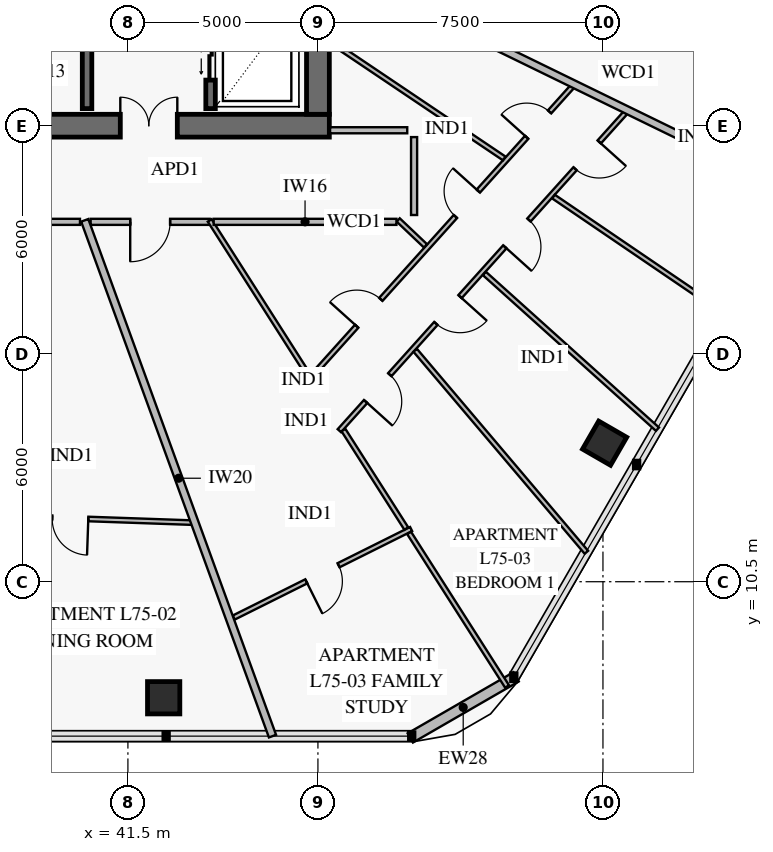
"""IFC4 building model, lengths in metres.
Left out: names, types, materials, properties, quantities, classifications, styles, units other than length and angle.
Written with IfcOpenShell. Run it as: python <this file> out.ifc"""

import sys

from ifc_helpers import new_model, si_unit, direction, frame, frame_2d, origin, origin_2d, place, context, subcontext, project, spatial, rectangle, extrude, element, fill, save


model = new_model("IFC4")
c1 = context("Model", 3, precision=1e-05, world=origin(), true_north=direction((0.0, 1.0)))
c2 = subcontext(c1, "Body", "Model", "MODEL_VIEW")
j1 = project(units=[si_unit("LENGTHUNIT", "METRE"), si_unit("PLANEANGLEUNIT", "RADIAN")], contexts=[c1])
p1 = place(None, origin())
s1 = spatial("IfcSite", under=j1, at=p1, CompositionType="ELEMENT")
p2 = place(p1, origin())
s2 = spatial("IfcBuilding", under=s1, at=p2, CompositionType="ELEMENT")
p3 = place(p2, frame((0.0, 0.0, 295.8)))
s3 = spatial("IfcBuildingStorey", under=s2, at=p3, CompositionType="ELEMENT", Elevation=295.8)
p4 = place(p3, frame((37.35, 22.5, 0.0), z_axis=(0.0, 0.0, 1.0), x_axis=(1.0, 0.0, 0.0)))
e1 = element("IfcWall", 1, at=p4, inside=s3, PredefinedType="SHEAR", context=c2, shape_type="SweptSolid", body=[
    extrude(rectangle(XDim=9.45, YDim=0.6, at=frame_2d((4.725, 0.0))), origin(), (0.0, 0.0, 1.0), 3.8),
])
p5 = place(p4, frame((3.95, 0.0, 0.0)))
e2 = element("IfcOpeningElement", 2, at=p5, cuts=e1, PredefinedType="OPENING", context=c2, shape_type="SweptSolid", body=[
    extrude(rectangle(XDim=1.5, YDim=2.15, at=frame_2d((0.75, 1.075))), frame((0.0, 0.312, 0.0), z_axis=(0.0, -1.0, 0.0), x_axis=(1.0, 0.0, 0.0)), (0.0, 0.0, 1.0), 0.624),
])
p6 = place(p3, frame((46.5, 22.8, 0.0), z_axis=(0.0, 0.0, 1.0), x_axis=(0.0, 1.0, 0.0)))
e3 = element("IfcWall", 3, at=p6, inside=s3, PredefinedType="SHEAR", context=c2, shape_type="SweptSolid", body=[
    extrude(rectangle(XDim=18.4, YDim=0.6, at=frame_2d((9.2, 0.0))), origin(), (0.0, 0.0, 1.0), 3.8),
])
p7 = place(p6, frame((8.95, 0.0, 0.0)))
e4 = element("IfcOpeningElement", 4, at=p7, cuts=e3, PredefinedType="OPENING", context=c2, shape_type="SweptSolid", body=[
    extrude(rectangle(XDim=1.1, YDim=2.15, at=frame_2d((0.55, 1.075))), frame((0.0, 0.312, 0.0), z_axis=(0.0, -1.0, 0.0), x_axis=(1.0, 0.0, 0.0)), (0.0, 0.0, 1.0), 0.624),
])
for number, where, z_axis, x_axis in (
    (5, (42.441, 7.446, 0.0), (0.0, 0.0, 1.0), (1.0, 0.0, 0.0)),
    (6, (54.044, 14.145, 0.0), (0.0, 0.0, 1.0), (0.5, 0.866, 0.0)),
):
    element("IfcColumn", number, at=place(p3, frame(where, z_axis=z_axis, x_axis=x_axis)), inside=s3, PredefinedType="COLUMN", context=c2, shape_type="SweptSolid", body=[
        extrude(rectangle(XDim=0.85, YDim=0.85, at=origin_2d()), origin(), (0.0, 0.0, 1.0), 3.55),
    ])
p8 = place(p3, frame((51.715, 7.996, 0.0), z_axis=(0.0, 0.0, 1.0), x_axis=(-0.866028773314, -0.499994163758, 0.0)))
e7 = element("IfcWall", 7, at=p8, inside=s3, PredefinedType="SOLIDWALL", context=c2, shape_type="SweptSolid", body=[
    extrude(rectangle(XDim=3.215, YDim=0.28, at=frame_2d((1.607, 0.0))), origin(), (0.0, 0.0, 1.0), 3.55),
])
p9 = place(p3, frame((40.425, 22.95, 0.0), z_axis=(0.0, 0.0, 1.0), x_axis=(0.0, 1.0, 0.0)))
e8 = element("IfcWall", 8, at=p9, inside=s3, PredefinedType="SOLIDWALL", context=c2, shape_type="SweptSolid", body=[
    extrude(rectangle(XDim=8.2, YDim=0.25, at=frame_2d((4.1, 0.0))), origin(), (0.0, 0.0, 1.0), 3.8),
])
p10 = place(p3, frame((43.675, 22.95, 0.0), z_axis=(0.0, 0.0, 1.0), x_axis=(0.0, 1.0, 0.0)))
e9 = element("IfcWall", 9, at=p10, inside=s3, PredefinedType="SOLIDWALL", context=c2, shape_type="SweptSolid", body=[
    extrude(rectangle(XDim=8.2, YDim=0.25, at=frame_2d((4.1, 0.0))), origin(), (0.0, 0.0, 1.0), 3.8),
])
p11 = place(p10, frame((0.75, 0.0, 0.0)))
e10 = element("IfcOpeningElement", 10, at=p11, cuts=e9, PredefinedType="OPENING", context=c2, shape_type="SweptSolid", body=[
    extrude(rectangle(XDim=1.3, YDim=2.3, at=frame_2d((0.65, 1.15))), frame((0.0, 0.137, 0.0), z_axis=(0.0, -1.0, 0.0), x_axis=(1.0, 0.0, 0.0)), (0.0, 0.0, 1.0), 0.274),
])
p12 = place(p10, frame((3.7, 0.0, 0.0)))
e11 = element("IfcOpeningElement", 11, at=p12, cuts=e9, PredefinedType="OPENING", context=c2, shape_type="SweptSolid", body=[
    extrude(rectangle(XDim=1.3, YDim=2.3, at=frame_2d((0.65, 1.15))), frame((0.0, 0.137, 0.0), z_axis=(0.0, -1.0, 0.0), x_axis=(1.0, 0.0, 0.0)), (0.0, 0.0, 1.0), 0.274),
])
p13 = place(p10, frame((6.62, 0.0, 0.0)))
e12 = element("IfcOpeningElement", 12, at=p13, cuts=e9, PredefinedType="OPENING", context=c2, shape_type="SweptSolid", body=[
    extrude(rectangle(XDim=0.9, YDim=2.1, at=frame_2d((0.45, 1.05))), frame((0.0, 0.137, 0.0), z_axis=(0.0, -1.0, 0.0), x_axis=(1.0, 0.0, 0.0)), (0.0, 0.0, 1.0), 0.274),
])
p14 = place(p3, frame((32.839, 12.417, 0.0), z_axis=(0.0, 0.0, 1.0), x_axis=(0.999390413178, -0.034911345561, 0.0)))
e13 = element("IfcWall", 13, at=p14, inside=s3, PredefinedType="PARTITIONING", context=c2, shape_type="SweptSolid", body=[
    extrude(rectangle(XDim=10.336, YDim=0.12, at=frame_2d((5.168, 0.0))), origin(), (0.0, 0.0, 1.0), 2.95),
])
p15 = place(p14, frame((1.746, 0.0, 0.0)))
e14 = element("IfcOpeningElement", 14, at=p15, cuts=e13, PredefinedType="OPENING", context=c2, shape_type="SweptSolid", body=[
    extrude(rectangle(XDim=0.95, YDim=2.1, at=frame_2d((0.475, 1.05))), frame((0.0, 0.072, 0.0), z_axis=(0.0, -1.0, 0.0), x_axis=(1.0, 0.0, 0.0)), (0.0, 0.0, 1.0), 0.144),
])
p16 = place(p14, frame((6.673, 0.0, 0.0)))
e15 = element("IfcOpeningElement", 15, at=p16, cuts=e13, PredefinedType="OPENING", context=c2, shape_type="SweptSolid", body=[
    extrude(rectangle(XDim=0.95, YDim=2.1, at=frame_2d((0.475, 1.05))), frame((0.0, 0.072, 0.0), z_axis=(0.0, -1.0, 0.0), x_axis=(1.0, 0.0, 0.0)), (0.0, 0.0, 1.0), 0.144),
])
p17 = place(p3, frame((44.284, 9.557, 0.0), z_axis=(0.0, 0.0, 1.0), x_axis=(0.894782574854, 0.446502120642, 0.0)))
e16 = element("IfcWall", 16, at=p17, inside=s3, PredefinedType="PARTITIONING", context=c2, shape_type="SweptSolid", body=[
    extrude(rectangle(XDim=5.217, YDim=0.12, at=frame_2d((2.608, 0.0))), origin(), (0.0, 0.0, 1.0), 3.55),
])
p18 = place(p17, frame((2.133, 0.0, 0.0)))
e17 = element("IfcOpeningElement", 17, at=p18, cuts=e16, PredefinedType="OPENING", context=c2, shape_type="SweptSolid", body=[
    extrude(rectangle(XDim=0.95, YDim=2.1, at=frame_2d((0.475, 1.05))), frame((0.0, 0.072, 0.0), z_axis=(0.0, -1.0, 0.0), x_axis=(1.0, 0.0, 0.0)), (0.0, 0.0, 1.0), 0.144),
])
p19 = place(p3, frame((46.227, 15.786, 0.0), z_axis=(0.0, 0.0, 1.0), x_axis=(0.668867693005, 0.743381469539, 0.0)))
e18 = element("IfcWall", 18, at=p19, inside=s3, PredefinedType="PARTITIONING", context=c2, shape_type="SweptSolid", body=[
    extrude(rectangle(XDim=10.426, YDim=0.12, at=frame_2d((5.213, 0.0))), origin(), (0.0, 0.0, 1.0), 2.95),
])
p20 = place(p19, frame((1.934, 0.0, 0.0)))
e19 = element("IfcOpeningElement", 19, at=p20, cuts=e18, PredefinedType="OPENING", context=c2, shape_type="SweptSolid", body=[
    extrude(rectangle(XDim=0.95, YDim=2.1, at=frame_2d((0.475, 1.05))), frame((0.0, 0.072, 0.0), z_axis=(0.0, -1.0, 0.0), x_axis=(1.0, 0.0, 0.0)), (0.0, 0.0, 1.0), 0.144),
])
p21 = place(p19, frame((5.818, 0.0, 0.0)))
e20 = element("IfcOpeningElement", 20, at=p21, cuts=e18, PredefinedType="OPENING", context=c2, shape_type="SweptSolid", body=[
    extrude(rectangle(XDim=0.9, YDim=2.1, at=frame_2d((0.45, 1.05))), frame((0.0, 0.072, 0.0), z_axis=(0.0, -1.0, 0.0), x_axis=(1.0, 0.0, 0.0)), (0.0, 0.0, 1.0), 0.144),
])
p22 = place(p19, frame((8.621, 0.0, 0.0)))
e21 = element("IfcOpeningElement", 21, at=p22, cuts=e18, PredefinedType="OPENING", context=c2, shape_type="SweptSolid", body=[
    extrude(rectangle(XDim=0.9, YDim=2.1, at=frame_2d((0.45, 1.05))), frame((0.0, 0.072, 0.0), z_axis=(0.0, -1.0, 0.0), x_axis=(1.0, 0.0, 0.0)), (0.0, 0.0, 1.0), 0.144),
])
p23 = place(p3, frame((47.064, 14.474, 0.0), z_axis=(0.0, 0.0, 1.0), x_axis=(0.66887365587, 0.743376104326, 0.0)))
e22 = element("IfcWall", 22, at=p23, inside=s3, PredefinedType="PARTITIONING", context=c2, shape_type="SweptSolid", body=[
    extrude(rectangle(XDim=11.256, YDim=0.12, at=frame_2d((5.628, 0.0))), origin(), (0.0, 0.0, 1.0), 2.95),
])
p24 = place(p23, frame((1.033, 0.0, 0.0)))
e23 = element("IfcOpeningElement", 23, at=p24, cuts=e22, PredefinedType="OPENING", context=c2, shape_type="SweptSolid", body=[
    extrude(rectangle(XDim=0.95, YDim=2.1, at=frame_2d((0.475, 1.05))), frame((0.0, 0.072, 0.0), z_axis=(0.0, -1.0, 0.0), x_axis=(1.0, 0.0, 0.0)), (0.0, 0.0, 1.0), 0.144),
])
p25 = place(p23, frame((3.797, 0.0, 0.0)))
e24 = element("IfcOpeningElement", 24, at=p25, cuts=e22, PredefinedType="OPENING", context=c2, shape_type="SweptSolid", body=[
    extrude(rectangle(XDim=0.95, YDim=2.1, at=frame_2d((0.475, 1.05))), frame((0.0, 0.072, 0.0), z_axis=(0.0, -1.0, 0.0), x_axis=(1.0, 0.0, 0.0)), (0.0, 0.0, 1.0), 0.144),
])
p26 = place(p23, frame((6.509, 0.0, 0.0)))
e25 = element("IfcOpeningElement", 25, at=p26, cuts=e22, PredefinedType="OPENING", context=c2, shape_type="SweptSolid", body=[
    extrude(rectangle(XDim=0.95, YDim=2.1, at=frame_2d((0.475, 1.05))), frame((0.0, 0.072, 0.0), z_axis=(0.0, -1.0, 0.0), x_axis=(1.0, 0.0, 0.0)), (0.0, 0.0, 1.0), 0.144),
])
p27 = place(p23, frame((9.273, 0.0, 0.0)))
e26 = element("IfcOpeningElement", 26, at=p27, cuts=e22, PredefinedType="OPENING", context=c2, shape_type="SweptSolid", body=[
    extrude(rectangle(XDim=0.95, YDim=2.1, at=frame_2d((0.475, 1.05))), frame((0.0, 0.072, 0.0), z_axis=(0.0, -1.0, 0.0), x_axis=(1.0, 0.0, 0.0)), (0.0, 0.0, 1.0), 0.144),
])
p28 = place(p3, frame((40.519, 19.97, 0.0), z_axis=(0.0, 0.0, 1.0), x_axis=(1.0, 0.0, 0.0)))
e27 = element("IfcWall", 27, at=p28, inside=s3, PredefinedType="PARTITIONING", context=c2, shape_type="SweptSolid", body=[
    extrude(rectangle(XDim=3.133, YDim=0.16, at=frame_2d((1.566, 0.0))), origin(), (0.0, 0.0, 1.0), 3.55),
])
p29 = place(p28, frame((1.042, 0.0, 0.0)))
e28 = element("IfcOpeningElement", 28, at=p29, cuts=e27, PredefinedType="OPENING", context=c2, shape_type="SweptSolid", body=[
    extrude(rectangle(XDim=1.05, YDim=2.15, at=frame_2d((0.525, 1.075))), frame((0.0, 0.092, 0.0), z_axis=(0.0, -1.0, 0.0), x_axis=(1.0, 0.0, 0.0)), (0.0, 0.0, 1.0), 0.184),
])
p30 = place(p3, frame((40.364, 20.01, 0.0), z_axis=(0.0, 0.0, 1.0), x_axis=(0.342019888345, -0.939692713591, 0.0)))
e29 = element("IfcWall", 29, at=p30, inside=s3, PredefinedType="PARTITIONING", context=c2, shape_type="SweptSolid", body=[
    extrude(rectangle(XDim=14.445, YDim=0.2, at=frame_2d((7.222, 0.0))), origin(), (0.0, 0.0, 1.0), 2.93),
])
p31 = place(p3, frame((48.612, 20.02, 0.0), z_axis=(0.0, 0.0, 1.0), x_axis=(0.725214586294, -0.688522914525, 0.0)))
e30 = element("IfcWall", 30, at=p31, inside=s3, PredefinedType="PARTITIONING", context=c2, shape_type="SweptSolid", body=[
    extrude(rectangle(XDim=0.991, YDim=0.12, at=frame_2d((0.496, 0.0))), origin(), (0.0, 0.0, 1.0), 3.55),
])
p32 = place(p3, frame((46.808, 24.729, 0.0), z_axis=(0.0, 0.0, 1.0), x_axis=(0.829729536965, -0.558165652372, 0.0)))
e31 = element("IfcWall", 31, at=p32, inside=s3, PredefinedType="PARTITIONING", context=c2, shape_type="SweptSolid", body=[
    extrude(rectangle(XDim=5.536, YDim=0.12, at=frame_2d((2.768, 0.0))), origin(), (0.0, 0.0, 1.0), 3.55),
])
p33 = place(p3, frame((49.06, 16.59, 0.0), z_axis=(0.0, 0.0, 1.0), x_axis=(0.646504412068, -0.76291024713, 0.0)))
e32 = element("IfcWall", 32, at=p33, inside=s3, PredefinedType="PARTITIONING", context=c2, shape_type="SweptSolid", body=[
    extrude(rectangle(XDim=6.967, YDim=0.12, at=frame_2d((3.484, 0.0))), origin(), (0.0, 0.0, 1.0), 2.93),
])
p34 = place(p3, frame((50.879, 18.612, 0.0), z_axis=(0.0, 0.0, 1.0), x_axis=(0.7433595212, -0.668892085647, 0.0)))
e33 = element("IfcWall", 33, at=p34, inside=s3, PredefinedType="PARTITIONING", context=c2, shape_type="SweptSolid", body=[
    extrude(rectangle(XDim=6.127, YDim=0.12, at=frame_2d((3.064, 0.0))), origin(), (0.0, 0.0, 1.0), 2.93),
])
p35 = place(p3, frame((52.699, 20.635, 0.0), z_axis=(0.0, 0.0, 1.0), x_axis=(0.826692890459, -0.562653414515, 0.0)))
e34 = element("IfcWall", 34, at=p35, inside=s3, PredefinedType="PARTITIONING", context=c2, shape_type="SweptSolid", body=[
    extrude(rectangle(XDim=5.444, YDim=0.12, at=frame_2d((2.722, 0.0))), origin(), (0.0, 0.0, 1.0), 2.93),
])
p36 = place(p3, frame((43.652, 20.007, 0.0), z_axis=(0.0, 0.0, 1.0), x_axis=(0.537879291551, -0.843021866692, 0.0)))
e35 = element("IfcWall", 35, at=p36, inside=s3, PredefinedType="PARTITIONING", context=c2, shape_type="SweptSolid", body=[
    extrude(rectangle(XDim=4.845, YDim=0.12, at=frame_2d((2.423, 0.0))), origin(), (0.0, 0.0, 1.0), 3.55),
])
p37 = place(p3, frame((47.171, 14.491, 0.0), z_axis=(0.0, 0.0, 1.0), x_axis=(0.537861418624, -0.843033270017, 0.0)))
e36 = element("IfcWall", 36, at=p37, inside=s3, PredefinedType="PARTITIONING", context=c2, shape_type="SweptSolid", body=[
    extrude(rectangle(XDim=3.075, YDim=0.12, at=frame_2d((1.538, 0.0))), origin(), (0.0, 0.0, 1.0), 3.55),
])
p38 = place(p3, frame((48.899, 11.784, 0.0), z_axis=(0.0, 0.0, 1.0), x_axis=(0.537919937196, -0.84299593188, 0.0)))
e37 = element("IfcWall", 37, at=p38, inside=s3, PredefinedType="PARTITIONING", context=c2, shape_type="SweptSolid", body=[
    extrude(rectangle(XDim=4.793, YDim=0.12, at=frame_2d((2.396, 0.0))), origin(), (0.0, 0.0, 1.0), 2.93),
])
p39 = place(p3, frame((46.808, 26.729, 0.0), z_axis=(0.0, 0.0, 1.0), x_axis=(0.89879587414, -0.438367399141, 0.0)))
e38 = element("IfcWall", 38, at=p39, inside=s3, PredefinedType="PARTITIONING", context=c2, shape_type="SweptSolid", body=[
    extrude(rectangle(XDim=13.601, YDim=0.2, at=frame_2d((6.8, 0.0))), origin(), (0.0, 0.0, 1.0), 2.93),
])
p40 = place(p3, frame((51.466, 26.816, 0.0), z_axis=(0.0, 0.0, 1.0), x_axis=(0.948160423288, -0.31779208881, 0.0)))
e39 = element("IfcWall", 39, at=p40, inside=s3, PredefinedType="PARTITIONING", context=c2, shape_type="SweptSolid", body=[
    extrude(rectangle(XDim=9.783, YDim=0.12, at=frame_2d((4.891, 0.0))), origin(), (0.0, 0.0, 1.0), 2.93),
])
p41 = place(p3, frame((37.368, 19.97, 0.0), z_axis=(0.0, 0.0, 1.0), x_axis=(1.0, 0.0, 0.0)))
e40 = element("IfcWall", 40, at=p41, inside=s3, PredefinedType="PARTITIONING", context=c2, shape_type="SweptSolid", body=[
    extrude(rectangle(XDim=2.871, YDim=0.16, at=frame_2d((1.436, 0.0))), origin(), (0.0, 0.0, 1.0), 2.95),
])
p42 = place(p3, frame((43.757, 19.97, 0.0), z_axis=(0.0, 0.0, 1.0), x_axis=(1.0, 0.0, 0.0)))
e41 = element("IfcWall", 41, at=p42, inside=s3, PredefinedType="PARTITIONING", context=c2, shape_type="SweptSolid", body=[
    extrude(rectangle(XDim=4.809, YDim=0.16, at=frame_2d((2.405, 0.0))), origin(), (0.0, 0.0, 1.0), 2.95),
])
p43 = place(p3, frame((49.03, 20.15, 0.0), z_axis=(0.0, 0.0, 1.0), x_axis=(0.0, 1.0, 0.0)))
e42 = element("IfcWall", 42, at=p43, inside=s3, PredefinedType="PARTITIONING", context=c2, shape_type="SweptSolid", body=[
    extrude(rectangle(XDim=2.05, YDim=0.16, at=frame_2d((1.025, 0.0))), origin(), (0.0, 0.0, 1.0), 3.55),
])
p44 = place(p3, frame((48.85, 22.38, 0.0), z_axis=(0.0, 0.0, 1.0), x_axis=(-1.0, 0.0, 0.0)))
e43 = element("IfcWall", 43, at=p44, inside=s3, PredefinedType="PARTITIONING", context=c2, shape_type="SweptSolid", body=[
    extrude(rectangle(XDim=2.03, YDim=0.16, at=frame_2d((1.015, 0.0))), origin(), (0.0, 0.0, 1.0), 3.55),
])
p45 = place(p5, origin())
e44 = element("IfcDoor", 44, at=p45, inside=s3, OperationType="DOUBLE_DOOR_SINGLE_SWING", PredefinedType="DOOR", context=c2, shape_type="SweptSolid", body=[
    extrude(rectangle(XDim=1.5, YDim=2.15, at=frame_2d((0.75, 1.075))), frame((0.0, 0.025, 0.0), z_axis=(0.0, -1.0, 0.0), x_axis=(1.0, 0.0, 0.0)), (0.0, 0.0, 1.0), 0.05),
])
fill(e2, e44)
p46 = place(p11, origin())
e45 = element("IfcDoor", 45, at=p46, inside=s3, OperationType="DOUBLE_DOOR_SLIDING", PredefinedType="DOOR", context=c2, shape_type="SweptSolid", body=[
    extrude(rectangle(XDim=1.3, YDim=2.3, at=frame_2d((0.65, 1.15))), frame((0.0, 0.025, 0.0), z_axis=(0.0, -1.0, 0.0), x_axis=(1.0, 0.0, 0.0)), (0.0, 0.0, 1.0), 0.05),
])
fill(e10, e45)
p47 = place(p16, frame((0.95, 0.0, 0.0), z_axis=(0.0, 0.0, 1.0), x_axis=(-1.0, 0.0, 0.0)))
e46 = element("IfcDoor", 46, at=p47, inside=s3, OperationType="SINGLE_SWING_LEFT", PredefinedType="DOOR", context=c2, shape_type="SweptSolid", body=[
    extrude(rectangle(XDim=0.95, YDim=2.1, at=frame_2d((0.475, 1.05))), frame((0.0, 0.025, 0.0), z_axis=(0.0, -1.0, 0.0), x_axis=(1.0, 0.0, 0.0)), (0.0, 0.0, 1.0), 0.05),
])
fill(e15, e46)
p48 = place(p18, frame((0.95, 0.0, 0.0), z_axis=(0.0, 0.0, 1.0), x_axis=(-1.0, 0.0, 0.0)))
e47 = element("IfcDoor", 47, at=p48, inside=s3, OperationType="SINGLE_SWING_RIGHT", PredefinedType="DOOR", context=c2, shape_type="SweptSolid", body=[
    extrude(rectangle(XDim=0.95, YDim=2.1, at=frame_2d((0.475, 1.05))), frame((0.0, 0.025, 0.0), z_axis=(0.0, -1.0, 0.0), x_axis=(1.0, 0.0, 0.0)), (0.0, 0.0, 1.0), 0.05),
])
fill(e17, e47)
p49 = place(p20, origin())
e48 = element("IfcDoor", 48, at=p49, inside=s3, OperationType="SINGLE_SWING_LEFT", PredefinedType="DOOR", context=c2, shape_type="SweptSolid", body=[
    extrude(rectangle(XDim=0.95, YDim=2.1, at=frame_2d((0.475, 1.05))), frame((0.0, 0.025, 0.0), z_axis=(0.0, -1.0, 0.0), x_axis=(1.0, 0.0, 0.0)), (0.0, 0.0, 1.0), 0.05),
])
fill(e19, e48)
p50 = place(p21, origin())
e49 = element("IfcDoor", 49, at=p50, inside=s3, OperationType="SINGLE_SWING_RIGHT", PredefinedType="DOOR", context=c2, shape_type="SweptSolid", body=[
    extrude(rectangle(XDim=0.9, YDim=2.1, at=frame_2d((0.45, 1.05))), frame((0.0, 0.025, 0.0), z_axis=(0.0, -1.0, 0.0), x_axis=(1.0, 0.0, 0.0)), (0.0, 0.0, 1.0), 0.05),
])
fill(e20, e49)
p51 = place(p22, origin())
e50 = element("IfcDoor", 50, at=p51, inside=s3, OperationType="SINGLE_SWING_LEFT", PredefinedType="DOOR", context=c2, shape_type="SweptSolid", body=[
    extrude(rectangle(XDim=0.9, YDim=2.1, at=frame_2d((0.45, 1.05))), frame((0.0, 0.025, 0.0), z_axis=(0.0, -1.0, 0.0), x_axis=(1.0, 0.0, 0.0)), (0.0, 0.0, 1.0), 0.05),
])
fill(e21, e50)
p52 = place(p24, frame((0.95, 0.0, 0.0), z_axis=(0.0, 0.0, 1.0), x_axis=(-1.0, 0.0, 0.0)))
e51 = element("IfcDoor", 51, at=p52, inside=s3, OperationType="SINGLE_SWING_RIGHT", PredefinedType="DOOR", context=c2, shape_type="SweptSolid", body=[
    extrude(rectangle(XDim=0.95, YDim=2.1, at=frame_2d((0.475, 1.05))), frame((0.0, 0.025, 0.0), z_axis=(0.0, -1.0, 0.0), x_axis=(1.0, 0.0, 0.0)), (0.0, 0.0, 1.0), 0.05),
])
fill(e23, e51)
p53 = place(p25, frame((0.95, 0.0, 0.0), z_axis=(0.0, 0.0, 1.0), x_axis=(-1.0, 0.0, 0.0)))
e52 = element("IfcDoor", 52, at=p53, inside=s3, OperationType="SINGLE_SWING_LEFT", PredefinedType="DOOR", context=c2, shape_type="SweptSolid", body=[
    extrude(rectangle(XDim=0.95, YDim=2.1, at=frame_2d((0.475, 1.05))), frame((0.0, 0.025, 0.0), z_axis=(0.0, -1.0, 0.0), x_axis=(1.0, 0.0, 0.0)), (0.0, 0.0, 1.0), 0.05),
])
fill(e24, e52)
p54 = place(p26, frame((0.95, 0.0, 0.0), z_axis=(0.0, 0.0, 1.0), x_axis=(-1.0, 0.0, 0.0)))
e53 = element("IfcDoor", 53, at=p54, inside=s3, OperationType="SINGLE_SWING_RIGHT", PredefinedType="DOOR", context=c2, shape_type="SweptSolid", body=[
    extrude(rectangle(XDim=0.95, YDim=2.1, at=frame_2d((0.475, 1.05))), frame((0.0, 0.025, 0.0), z_axis=(0.0, -1.0, 0.0), x_axis=(1.0, 0.0, 0.0)), (0.0, 0.0, 1.0), 0.05),
])
fill(e25, e53)
p55 = place(p27, frame((0.95, 0.0, 0.0), z_axis=(0.0, 0.0, 1.0), x_axis=(-1.0, 0.0, 0.0)))
e54 = element("IfcDoor", 54, at=p55, inside=s3, OperationType="SINGLE_SWING_LEFT", PredefinedType="DOOR", context=c2, shape_type="SweptSolid", body=[
    extrude(rectangle(XDim=0.95, YDim=2.1, at=frame_2d((0.475, 1.05))), frame((0.0, 0.025, 0.0), z_axis=(0.0, -1.0, 0.0), x_axis=(1.0, 0.0, 0.0)), (0.0, 0.0, 1.0), 0.05),
])
fill(e26, e54)
p56 = place(p29, frame((1.05, 0.0, 0.0), z_axis=(0.0, 0.0, 1.0), x_axis=(-1.0, 0.0, 0.0)))
e55 = element("IfcDoor", 55, at=p56, inside=s3, OperationType="SINGLE_SWING_RIGHT", PredefinedType="DOOR", context=c2, shape_type="SweptSolid", body=[
    extrude(rectangle(XDim=1.05, YDim=2.15, at=frame_2d((0.525, 1.075))), frame((0.0, 0.025, 0.0), z_axis=(0.0, -1.0, 0.0), x_axis=(1.0, 0.0, 0.0)), (0.0, 0.0, 1.0), 0.05),
])
fill(e28, e55)
save(model, sys.argv[1])
